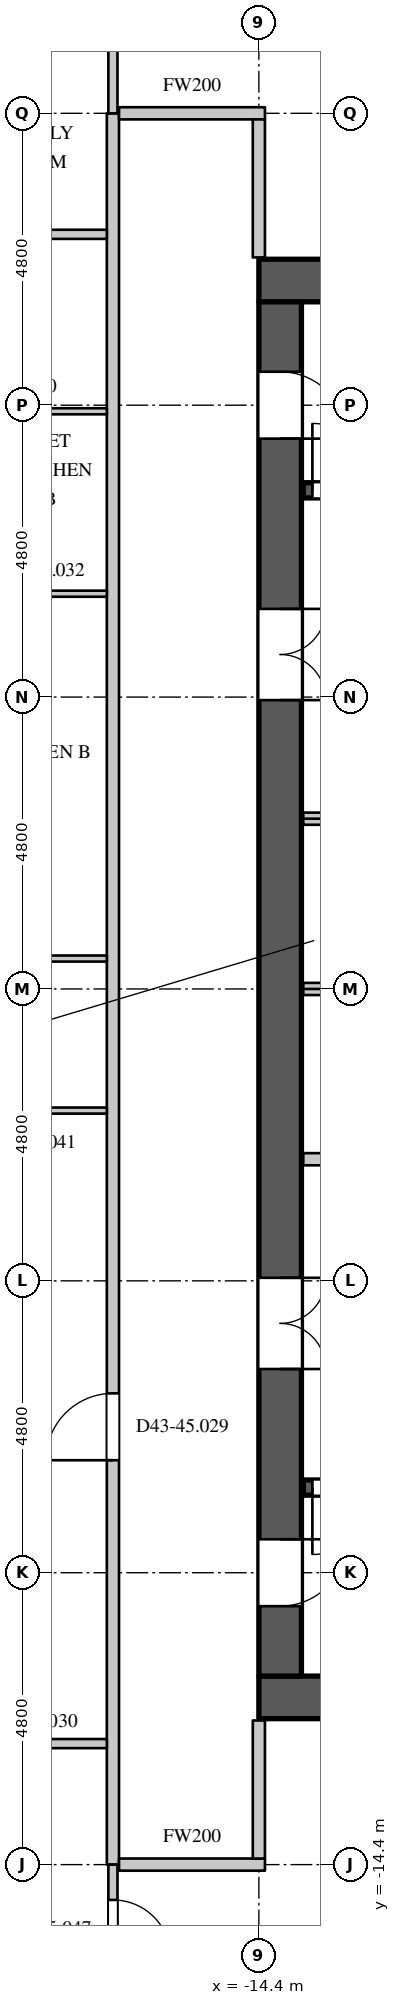
"""IFC4 building model, lengths in metres.
Left out: names, types, materials, properties, quantities, classifications, styles, units other than length and angle.
Written with IfcOpenShell. Run it as: python <this file> out.ifc"""

import sys

from ifc_helpers import new_model, si_unit, direction, frame, frame_2d, origin, place, context, subcontext, project, spatial, rectangle, extrude, element, fill, save


model = new_model("IFC4")
c1 = context("Model", 3, precision=1e-05, world=origin(), true_north=direction((0.0, 1.0)))
c2 = subcontext(c1, "Body", "Model", "MODEL_VIEW")
j1 = project(units=[si_unit("LENGTHUNIT", "METRE"), si_unit("PLANEANGLEUNIT", "RADIAN")], contexts=[c1])
p1 = place(None, origin())
s1 = spatial("IfcSite", under=j1, at=p1, CompositionType="ELEMENT")
p2 = place(p1, origin())
s2 = spatial("IfcBuilding", under=s1, at=p2, CompositionType="ELEMENT")
p3 = place(p2, frame((0.0, 0.0, 187.5)))
s3 = spatial("IfcBuildingStorey", under=s2, at=p3, CompositionType="ELEMENT", Elevation=187.5)
for number, where, z_axis, x_axis in (
    (1, (-14.4, 11.65, 0.0), (0.0, 0.0, 1.0), (1.0, 0.0, 0.0)),
    (2, (-14.4, -11.65, 0.0), (0.0, 0.0, 1.0), (1.0, 0.0, 0.0)),
):
    element("IfcWall", number, at=place(p3, frame(where, z_axis=z_axis, x_axis=x_axis)), inside=s3, PredefinedType="SHEAR", context=c2, shape_type="SweptSolid", body=[
        extrude(rectangle(XDim=28.8, YDim=0.7, at=frame_2d((14.4, 0.0))), origin(), (0.0, 0.0, 1.0), 4.2),
    ])
p4 = place(p3, frame((-14.05, -11.3, 0.0), z_axis=(0.0, 0.0, 1.0), x_axis=(0.0, 1.0, 0.0)))
e3 = element("IfcWall", 3, at=p4, inside=s3, PredefinedType="SHEAR", context=c2, shape_type="SweptSolid", body=[
    extrude(rectangle(XDim=22.6, YDim=0.7, at=frame_2d((11.3, 0.0))), origin(), (0.0, 0.0, 1.0), 4.2),
])
p5 = place(p4, frame((20.35, 0.0, 0.0)))
e4 = element("IfcOpeningElement", 4, at=p5, cuts=e3, PredefinedType="OPENING", context=c2, shape_type="SweptSolid", body=[
    extrude(rectangle(XDim=1.1, YDim=2.2, at=frame_2d((0.55, 1.1))), frame((0.0, 0.36, 0.0), z_axis=(0.0, -1.0, 0.0), x_axis=(1.0, 0.0, 0.0)), (0.0, 0.0, 1.0), 0.72),
])
p6 = place(p4, frame((1.15, 0.0, 0.0)))
e5 = element("IfcOpeningElement", 5, at=p6, cuts=e3, PredefinedType="OPENING", context=c2, shape_type="SweptSolid", body=[
    extrude(rectangle(XDim=1.1, YDim=2.2, at=frame_2d((0.55, 1.1))), frame((0.0, 0.36, 0.0), z_axis=(0.0, -1.0, 0.0), x_axis=(1.0, 0.0, 0.0)), (0.0, 0.0, 1.0), 0.72),
])
p7 = place(p4, frame((16.05, 0.0, 0.0)))
e6 = element("IfcOpeningElement", 6, at=p7, cuts=e3, PredefinedType="OPENING", context=c2, shape_type="SweptSolid", body=[
    extrude(rectangle(XDim=1.5, YDim=2.4, at=frame_2d((0.75, 1.2))), frame((0.0, 0.36, 0.0), z_axis=(0.0, -1.0, 0.0), x_axis=(1.0, 0.0, 0.0)), (0.0, 0.0, 1.0), 0.72),
])
p8 = place(p4, frame((5.05, 0.0, 0.0)))
e7 = element("IfcOpeningElement", 7, at=p8, cuts=e3, PredefinedType="OPENING", context=c2, shape_type="SweptSolid", body=[
    extrude(rectangle(XDim=1.5, YDim=2.4, at=frame_2d((0.75, 1.2))), frame((0.0, 0.36, 0.0), z_axis=(0.0, -1.0, 0.0), x_axis=(1.0, 0.0, 0.0)), (0.0, 0.0, 1.0), 0.72),
])
p9 = place(p3, frame((-16.8, -14.4, 0.0), z_axis=(0.0, 0.0, 1.0), x_axis=(0.0, 1.0, 0.0)))
e8 = element("IfcWall", 8, at=p9, inside=s3, PredefinedType="PARTITIONING", context=c2, shape_type="SweptSolid", body=[
    extrude(rectangle(XDim=28.8, YDim=0.2, at=frame_2d((14.4, 0.0))), origin(), (0.0, 0.0, 1.0), 3.95),
])
p10 = place(p9, frame((6.65, 0.0, 0.0)))
e9 = element("IfcOpeningElement", 9, at=p10, cuts=e8, PredefinedType="OPENING", context=c2, shape_type="SweptSolid", body=[
    extrude(rectangle(XDim=1.1, YDim=2.4, at=frame_2d((0.55, 1.2))), frame((0.0, 0.11, 0.0), z_axis=(0.0, -1.0, 0.0), x_axis=(1.0, 0.0, 0.0)), (0.0, 0.0, 1.0), 0.22),
])
for number, where, z_axis, x_axis in (
    (10, (-16.7, -14.4, 0.0), (0.0, 0.0, 1.0), (1.0, 0.0, 0.0)),
    (11, (-16.7, 14.4, 0.0), (0.0, 0.0, 1.0), (1.0, 0.0, 0.0)),
):
    element("IfcWall", number, at=place(p3, frame(where, z_axis=z_axis, x_axis=x_axis)), inside=s3, PredefinedType="PARTITIONING", context=c2, shape_type="SweptSolid", body=[
        extrude(rectangle(XDim=2.4, YDim=0.2, at=frame_2d((1.2, 0.0))), origin(), (0.0, 0.0, 1.0), 3.95),
    ])
for number, where, z_axis, x_axis in (
    (12, (-14.4, -14.3, 0.0), (0.0, 0.0, 1.0), (0.0, 1.0, 0.0)),
    (13, (-14.4, 12.03, 0.0), (0.0, 0.0, 1.0), (0.0, 1.0, 0.0)),
):
    element("IfcWall", number, at=place(p3, frame(where, z_axis=z_axis, x_axis=x_axis)), inside=s3, PredefinedType="PARTITIONING", context=c2, shape_type="SweptSolid", body=[
        extrude(rectangle(XDim=2.27, YDim=0.2, at=frame_2d((1.135, 0.0))), origin(), (0.0, 0.0, 1.0), 3.95),
    ])
p11 = place(p3, frame((-22.529, -12.41, 0.0), z_axis=(0.0, 0.0, 1.0), x_axis=(1.0, 0.0, 0.0)))
e14 = element("IfcWall", 14, at=p11, inside=s3, PredefinedType="PARTITIONING", context=c2, shape_type="SweptSolid", body=[
    extrude(rectangle(XDim=5.629, YDim=0.15, at=frame_2d((2.815, 0.0))), origin(), (0.0, 0.0, 1.0), 3.95),
])
p12 = place(p11, frame((3.56, 0.0, 0.0)))
e15 = element("IfcOpeningElement", 15, at=p12, cuts=e14, PredefinedType="OPENING", context=c2, shape_type="SweptSolid", body=[
    extrude(rectangle(XDim=0.95, YDim=2.2, at=frame_2d((0.475, 1.1))), frame((0.0, 0.085, 0.0), z_axis=(0.0, -1.0, 0.0), x_axis=(1.0, 0.0, 0.0)), (0.0, 0.0, 1.0), 0.17),
])
p13 = place(p3, frame((-22.529, 12.41, 0.0), z_axis=(0.0, 0.0, 1.0), x_axis=(1.0, 0.0, 0.0)))
e16 = element("IfcWall", 16, at=p13, inside=s3, PredefinedType="PARTITIONING", context=c2, shape_type="SweptSolid", body=[
    extrude(rectangle(XDim=5.629, YDim=0.15, at=frame_2d((2.815, 0.0))), origin(), (0.0, 0.0, 1.0), 3.95),
])
p14 = place(p13, frame((0.76, 0.0, 0.0)))
e17 = element("IfcOpeningElement", 17, at=p14, cuts=e16, PredefinedType="OPENING", context=c2, shape_type="SweptSolid", body=[
    extrude(rectangle(XDim=0.95, YDim=2.2, at=frame_2d((0.475, 1.1))), frame((0.0, 0.085, 0.0), z_axis=(0.0, -1.0, 0.0), x_axis=(1.0, 0.0, 0.0)), (0.0, 0.0, 1.0), 0.17),
])
p15 = place(p3, frame((-16.8, -18.131, 0.0), z_axis=(0.0, 0.0, 1.0), x_axis=(0.0, 1.0, 0.0)))
e18 = element("IfcWall", 18, at=p15, inside=s3, PredefinedType="PARTITIONING", context=c2, shape_type="SweptSolid", body=[
    extrude(rectangle(XDim=3.731, YDim=0.15, at=frame_2d((1.865, 0.0))), origin(), (0.0, 0.0, 1.0), 3.95),
])
p16 = place(p15, frame((2.2, 0.0, 0.0)))
e19 = element("IfcOpeningElement", 19, at=p16, cuts=e18, PredefinedType="OPENING", context=c2, shape_type="SweptSolid", body=[
    extrude(rectangle(XDim=0.95, YDim=2.2, at=frame_2d((0.475, 1.1))), frame((0.0, 0.085, 0.0), z_axis=(0.0, -1.0, 0.0), x_axis=(1.0, 0.0, 0.0)), (0.0, 0.0, 1.0), 0.17),
])
p17 = place(p3, frame((-16.8, 14.4, 0.0), z_axis=(0.0, 0.0, 1.0), x_axis=(0.0, 1.0, 0.0)))
e20 = element("IfcWall", 20, at=p17, inside=s3, PredefinedType="PARTITIONING", context=c2, shape_type="SweptSolid", body=[
    extrude(rectangle(XDim=3.731, YDim=0.15, at=frame_2d((1.865, 0.0))), origin(), (0.0, 0.0, 1.0), 3.95),
])
p18 = place(p17, frame((2.0, 0.0, 0.0)))
e21 = element("IfcOpeningElement", 21, at=p18, cuts=e20, PredefinedType="OPENING", context=c2, shape_type="SweptSolid", body=[
    extrude(rectangle(XDim=0.95, YDim=2.2, at=frame_2d((0.475, 1.1))), frame((0.0, 0.085, 0.0), z_axis=(0.0, -1.0, 0.0), x_axis=(1.0, 0.0, 0.0)), (0.0, 0.0, 1.0), 0.17),
])
p19 = place(p3, frame((-13.67, -2.8, 0.0), z_axis=(0.0, 0.0, 1.0), x_axis=(1.0, 0.0, 0.0)))
e22 = element("IfcWall", 22, at=p19, inside=s3, PredefinedType="PARTITIONING", context=c2, shape_type="SweptSolid", body=[
    extrude(rectangle(XDim=3.27, YDim=0.2, at=frame_2d((1.635, 0.0))), origin(), (0.0, 0.0, 1.0), 3.95),
])
p20 = place(p19, frame((1.3, 0.0, 0.0)))
e23 = element("IfcOpeningElement", 23, at=p20, cuts=e22, PredefinedType="OPENING", context=c2, shape_type="SweptSolid", body=[
    extrude(rectangle(XDim=0.6, YDim=2.0, at=frame_2d((0.3, 1.0))), frame((0.0, 0.11, 0.0), z_axis=(0.0, -1.0, 0.0), x_axis=(1.0, 0.0, 0.0)), (0.0, 0.0, 1.0), 0.22),
])
p21 = place(p3, frame((-13.67, 0.0, 0.0), z_axis=(0.0, 0.0, 1.0), x_axis=(1.0, 0.0, 0.0)))
e24 = element("IfcWall", 24, at=p21, inside=s3, PredefinedType="PARTITIONING", context=c2, shape_type="SweptSolid", body=[
    extrude(rectangle(XDim=21.47, YDim=0.2, at=frame_2d((10.735, 0.0))), origin(), (0.0, 0.0, 1.0), 3.95),
])
p22 = place(p3, frame((-13.67, 2.8, 0.0), z_axis=(0.0, 0.0, 1.0), x_axis=(1.0, 0.0, 0.0)))
e25 = element("IfcWall", 25, at=p22, inside=s3, PredefinedType="PARTITIONING", context=c2, shape_type="SweptSolid", body=[
    extrude(rectangle(XDim=5.87, YDim=0.2, at=frame_2d((2.935, 0.0))), origin(), (0.0, 0.0, 1.0), 3.95),
])
p23 = place(p22, frame((1.05, 0.0, 0.0)))
e26 = element("IfcOpeningElement", 26, at=p23, cuts=e25, PredefinedType="OPENING", context=c2, shape_type="SweptSolid", body=[
    extrude(rectangle(XDim=1.1, YDim=2.2, at=frame_2d((0.55, 1.1))), frame((0.0, 0.11, 0.0), z_axis=(0.0, -1.0, 0.0), x_axis=(1.0, 0.0, 0.0)), (0.0, 0.0, 1.0), 0.22),
])
p24 = place(p22, frame((4.0, 0.0, 0.0)))
e27 = element("IfcOpeningElement", 27, at=p24, cuts=e25, PredefinedType="OPENING", context=c2, shape_type="SweptSolid", body=[
    extrude(rectangle(XDim=1.1, YDim=2.2, at=frame_2d((0.55, 1.1))), frame((0.0, 0.11, 0.0), z_axis=(0.0, -1.0, 0.0), x_axis=(1.0, 0.0, 0.0)), (0.0, 0.0, 1.0), 0.22),
])
p25 = place(p3, frame((-13.67, -8.2, 0.0), z_axis=(0.0, 0.0, 1.0), x_axis=(1.0, 0.0, 0.0)))
e28 = element("IfcWall", 28, at=p25, inside=s3, PredefinedType="SHEAR", context=c2, shape_type="SweptSolid", body=[
    extrude(rectangle(XDim=8.395, YDim=0.25, at=frame_2d((4.198, 0.0))), origin(), (0.0, 0.0, 1.0), 3.95),
])
p26 = place(p25, frame((0.15, 0.0, 0.0)))
e29 = element("IfcOpeningElement", 29, at=p26, cuts=e28, PredefinedType="OPENING", context=c2, shape_type="SweptSolid", body=[
    extrude(rectangle(XDim=1.1, YDim=2.2, at=frame_2d((0.55, 1.1))), frame((0.0, 0.135, 0.0), z_axis=(0.0, -1.0, 0.0), x_axis=(1.0, 0.0, 0.0)), (0.0, 0.0, 1.0), 0.27),
])
p27 = place(p3, frame((-13.67, 8.2, 0.0), z_axis=(0.0, 0.0, 1.0), x_axis=(1.0, 0.0, 0.0)))
e30 = element("IfcWall", 30, at=p27, inside=s3, PredefinedType="SHEAR", context=c2, shape_type="SweptSolid", body=[
    extrude(rectangle(XDim=8.395, YDim=0.25, at=frame_2d((4.198, 0.0))), origin(), (0.0, 0.0, 1.0), 3.95),
])
p28 = place(p27, frame((0.15, 0.0, 0.0)))
e31 = element("IfcOpeningElement", 31, at=p28, cuts=e30, PredefinedType="OPENING", context=c2, shape_type="SweptSolid", body=[
    extrude(rectangle(XDim=1.1, YDim=2.2, at=frame_2d((0.55, 1.1))), frame((0.0, 0.135, 0.0), z_axis=(0.0, -1.0, 0.0), x_axis=(1.0, 0.0, 0.0)), (0.0, 0.0, 1.0), 0.27),
])
p29 = place(p3, frame((-20.45, -2.0, 0.0), z_axis=(0.0, 0.0, 1.0), x_axis=(1.0, 0.0, 0.0)))
e32 = element("IfcWall", 32, at=p29, inside=s3, PredefinedType="PARTITIONING", context=c2, shape_type="SweptSolid", body=[
    extrude(rectangle(XDim=3.55, YDim=0.1, at=frame_2d((1.775, 0.0))), origin(), (0.0, 0.0, 1.0), 3.95),
])
p30 = place(p29, frame((1.3, 0.0, 0.0)))
e33 = element("IfcOpeningElement", 33, at=p30, cuts=e32, PredefinedType="OPENING", context=c2, shape_type="SweptSolid", body=[
    extrude(rectangle(XDim=0.9, YDim=2.2, at=frame_2d((0.45, 1.1))), frame((0.0, 0.06, 0.0), z_axis=(0.0, -1.0, 0.0), x_axis=(1.0, 0.0, 0.0)), (0.0, 0.0, 1.0), 0.12),
])
p31 = place(p3, frame((-20.425, 0.5, 0.0), z_axis=(0.0, 0.0, 1.0), x_axis=(1.0, 0.0, 0.0)))
e34 = element("IfcWall", 34, at=p31, inside=s3, PredefinedType="PARTITIONING", context=c2, shape_type="SweptSolid", body=[
    extrude(rectangle(XDim=3.525, YDim=0.1, at=frame_2d((1.763, 0.0))), origin(), (0.0, 0.0, 1.0), 3.95),
])
p32 = place(p3, frame((-20.425, 6.5, 0.0), z_axis=(0.0, 0.0, 1.0), x_axis=(1.0, 0.0, 0.0)))
e35 = element("IfcWall", 35, at=p32, inside=s3, PredefinedType="PARTITIONING", context=c2, shape_type="SweptSolid", body=[
    extrude(rectangle(XDim=3.525, YDim=0.1, at=frame_2d((1.763, 0.0))), origin(), (0.0, 0.0, 1.0), 3.95),
])
p33 = place(p32, frame((1.3, 0.0, 0.0)))
e36 = element("IfcOpeningElement", 36, at=p33, cuts=e35, PredefinedType="OPENING", context=c2, shape_type="SweptSolid", body=[
    extrude(rectangle(XDim=0.9, YDim=2.2, at=frame_2d((0.45, 1.1))), frame((0.0, 0.06, 0.0), z_axis=(0.0, -1.0, 0.0), x_axis=(1.0, 0.0, 0.0)), (0.0, 0.0, 1.0), 0.12),
])
p34 = place(p3, frame((-19.475, 9.5, 0.0), z_axis=(0.0, 0.0, 1.0), x_axis=(1.0, 0.0, 0.0)))
e37 = element("IfcWall", 37, at=p34, inside=s3, PredefinedType="PARTITIONING", context=c2, shape_type="SweptSolid", body=[
    extrude(rectangle(XDim=2.575, YDim=0.1, at=frame_2d((1.288, 0.0))), origin(), (0.0, 0.0, 1.0), 3.95),
])
p35 = place(p28, origin())
e38 = element("IfcDoor", 38, at=p35, inside=s3, OperationType="SINGLE_SWING_LEFT", PredefinedType="DOOR", context=c2, shape_type="SweptSolid", body=[
    extrude(rectangle(XDim=1.1, YDim=2.2, at=frame_2d((0.55, 1.1))), frame((0.0, 0.025, 0.0), z_axis=(0.0, -1.0, 0.0), x_axis=(1.0, 0.0, 0.0)), (0.0, 0.0, 1.0), 0.05),
])
fill(e31, e38)
p36 = place(p26, origin())
e39 = element("IfcDoor", 39, at=p36, inside=s3, OperationType="SINGLE_SWING_RIGHT", PredefinedType="DOOR", context=c2, shape_type="SweptSolid", body=[
    extrude(rectangle(XDim=1.1, YDim=2.2, at=frame_2d((0.55, 1.1))), frame((0.0, 0.025, 0.0), z_axis=(0.0, -1.0, 0.0), x_axis=(1.0, 0.0, 0.0)), (0.0, 0.0, 1.0), 0.05),
])
fill(e29, e39)
p37 = place(p5, origin())
e40 = element("IfcDoor", 40, at=p37, inside=s3, OperationType="SINGLE_SWING_RIGHT", PredefinedType="DOOR", context=c2, shape_type="SweptSolid", body=[
    extrude(rectangle(XDim=1.1, YDim=2.2, at=frame_2d((0.55, 1.1))), frame((0.0, -0.295, 0.0), z_axis=(0.0, -1.0, 0.0), x_axis=(1.0, 0.0, 0.0)), (0.0, 0.0, 1.0), 0.05),
])
fill(e4, e40)
p38 = place(p6, origin())
e41 = element("IfcDoor", 41, at=p38, inside=s3, OperationType="SINGLE_SWING_LEFT", PredefinedType="DOOR", context=c2, shape_type="SweptSolid", body=[
    extrude(rectangle(XDim=1.1, YDim=2.2, at=frame_2d((0.55, 1.1))), frame((0.0, -0.295, 0.0), z_axis=(0.0, -1.0, 0.0), x_axis=(1.0, 0.0, 0.0)), (0.0, 0.0, 1.0), 0.05),
])
fill(e5, e41)
p39 = place(p7, origin())
e42 = element("IfcDoor", 42, at=p39, inside=s3, OperationType="DOUBLE_DOOR_SINGLE_SWING", PredefinedType="DOOR", context=c2, shape_type="SweptSolid", body=[
    extrude(rectangle(XDim=1.5, YDim=2.4, at=frame_2d((0.75, 1.2))), frame((0.0, -0.295, 0.0), z_axis=(0.0, -1.0, 0.0), x_axis=(1.0, 0.0, 0.0)), (0.0, 0.0, 1.0), 0.05),
])
fill(e6, e42)
p40 = place(p8, origin())
e43 = element("IfcDoor", 43, at=p40, inside=s3, OperationType="DOUBLE_DOOR_SINGLE_SWING", PredefinedType="DOOR", context=c2, shape_type="SweptSolid", body=[
    extrude(rectangle(XDim=1.5, YDim=2.4, at=frame_2d((0.75, 1.2))), frame((0.0, -0.295, 0.0), z_axis=(0.0, -1.0, 0.0), x_axis=(1.0, 0.0, 0.0)), (0.0, 0.0, 1.0), 0.05),
])
fill(e7, e43)
p41 = place(p10, origin())
e44 = element("IfcDoor", 44, at=p41, inside=s3, OperationType="SINGLE_SWING_LEFT", PredefinedType="DOOR", context=c2, shape_type="SweptSolid", body=[
    extrude(rectangle(XDim=1.1, YDim=2.4, at=frame_2d((0.55, 1.2))), frame((0.0, 0.025, 0.0), z_axis=(0.0, -1.0, 0.0), x_axis=(1.0, 0.0, 0.0)), (0.0, 0.0, 1.0), 0.05),
])
fill(e9, e44)
p42 = place(p16, origin())
e45 = element("IfcDoor", 45, at=p42, inside=s3, OperationType="SINGLE_SWING_RIGHT", PredefinedType="DOOR", context=c2, shape_type="SweptSolid", body=[
    extrude(rectangle(XDim=0.95, YDim=2.2, at=frame_2d((0.475, 1.1))), frame((0.0, 0.025, 0.0), z_axis=(0.0, -1.0, 0.0), x_axis=(1.0, 0.0, 0.0)), (0.0, 0.0, 1.0), 0.05),
])
fill(e19, e45)
save(model, sys.argv[1])
